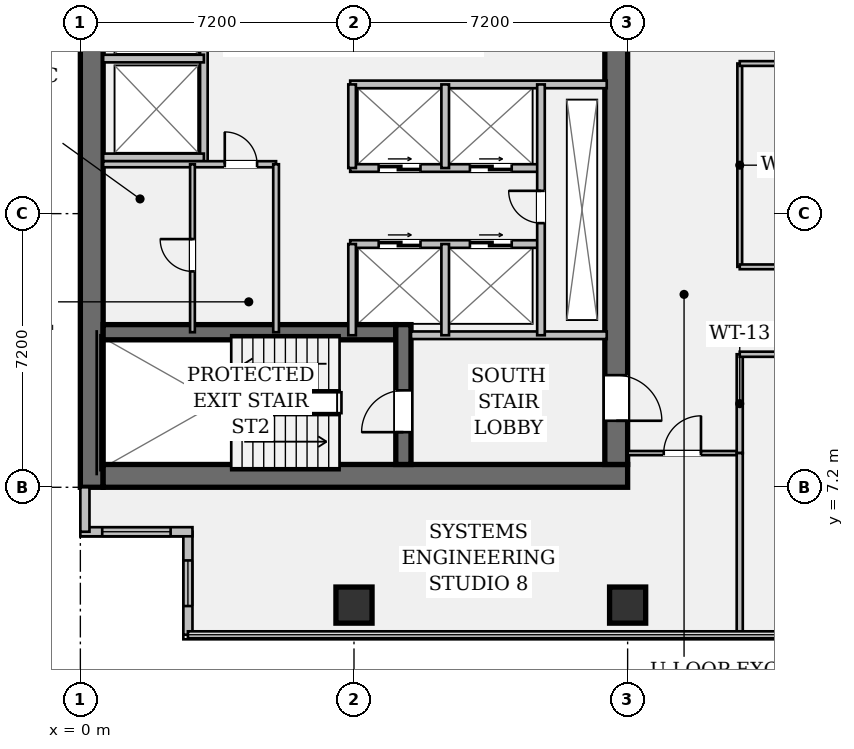
"""IFC4 building model, lengths in metres.
Left out: names, types, materials, properties, quantities, classifications, styles, units other than length and angle.
Written with IfcOpenShell. Run it as: python <this file> out.ifc"""

import sys

from ifc_helpers import new_model, si_unit, direction, frame, frame_2d, origin, origin_2d, place, context, subcontext, project, spatial, rectangle, hollow_rectangle, extrude, element, fill, save


model = new_model("IFC4")
c1 = context("Model", 3, precision=1e-05, world=origin(), true_north=direction((0.0, 1.0)))
c2 = subcontext(c1, "Body", "Model", "MODEL_VIEW")
j1 = project(units=[si_unit("LENGTHUNIT", "METRE"), si_unit("PLANEANGLEUNIT", "RADIAN")], contexts=[c1])
p1 = place(None, origin())
s1 = spatial("IfcSite", under=j1, at=p1, CompositionType="ELEMENT")
p2 = place(p1, origin())
s2 = spatial("IfcBuilding", under=s1, at=p2, CompositionType="ELEMENT")
p3 = place(p2, frame((0.0, 0.0, 113.75)))
s3 = spatial("IfcBuildingStorey", under=s2, at=p3, CompositionType="ELEMENT", Elevation=113.75)
p4 = place(p3, frame((0.3, 7.2, 0.0), z_axis=(0.0, 0.0, 1.0), x_axis=(0.0, 1.0, 0.0)))
e1 = element("IfcWall", 1, at=p4, inside=s3, PredefinedType="SHEAR", context=c2, shape_type="SweptSolid", body=[
    extrude(rectangle(XDim=28.8, YDim=0.6, at=frame_2d((14.4, 0.0))), origin(), (0.0, 0.0, 1.0), 3.58),
])
p5 = place(p3, frame((0.6, 7.5, 0.0), z_axis=(0.0, 0.0, 1.0), x_axis=(1.0, 0.0, 0.0)))
e2 = element("IfcWall", 2, at=p5, inside=s3, PredefinedType="SHEAR", context=c2, shape_type="SweptSolid", body=[
    extrude(rectangle(XDim=13.8, YDim=0.6, at=frame_2d((6.9, 0.0))), origin(), (0.0, 0.0, 1.0), 3.58),
])
p6 = place(p3, frame((14.1, 35.4, 0.0), z_axis=(0.0, 0.0, 1.0), x_axis=(0.0, -1.0, 0.0)))
e3 = element("IfcWall", 3, at=p6, inside=s3, PredefinedType="SHEAR", context=c2, shape_type="SweptSolid", body=[
    extrude(rectangle(XDim=27.6, YDim=0.6, at=frame_2d((13.8, 0.0))), origin(), (0.0, 0.0, 1.0), 3.58),
])
p7 = place(p6, frame((1.3, 0.0, 0.0)))
e4 = element("IfcOpeningElement", 4, at=p7, cuts=e3, PredefinedType="OPENING", context=c2, shape_type="SweptSolid", body=[
    extrude(rectangle(XDim=1.2, YDim=2.15, at=frame_2d((0.6, 1.075))), frame((0.0, 0.312, 0.0), z_axis=(0.0, -1.0, 0.0), x_axis=(1.0, 0.0, 0.0)), (0.0, 0.0, 1.0), 0.624),
])
p8 = place(p6, frame((25.25, 0.0, 0.0)))
e5 = element("IfcOpeningElement", 5, at=p8, cuts=e3, PredefinedType="OPENING", context=c2, shape_type="SweptSolid", body=[
    extrude(rectangle(XDim=1.2, YDim=2.15, at=frame_2d((0.6, 1.075))), frame((0.0, 0.312, 0.0), z_axis=(0.0, -1.0, 0.0), x_axis=(1.0, 0.0, 0.0)), (0.0, 0.0, 1.0), 0.624),
])
p9 = place(p6, frame((14.6, 0.0, 0.0)))
e6 = element("IfcOpeningElement", 6, at=p9, cuts=e3, PredefinedType="OPENING", context=c2, shape_type="SweptSolid", body=[
    extrude(rectangle(XDim=1.6, YDim=2.2, at=frame_2d((0.8, 1.1))), frame((0.0, 0.312, 0.0), z_axis=(0.0, -1.0, 0.0), x_axis=(1.0, 0.0, 0.0)), (0.0, 0.0, 1.0), 0.624),
])
p10 = place(p3, frame((0.6, 11.28, 0.0), z_axis=(0.0, 0.0, 1.0), x_axis=(1.0, 0.0, 0.0)))
e7 = element("IfcWall", 7, at=p10, inside=s3, PredefinedType="SHEAR", context=c2, shape_type="SweptSolid", body=[
    extrude(rectangle(XDim=7.7, YDim=0.4, at=frame_2d((3.85, 0.0))), origin(), (0.0, 0.0, 1.0), 3.58),
])
p11 = place(p3, frame((8.5, 7.8, 0.0), z_axis=(0.0, 0.0, 1.0), x_axis=(0.0, 1.0, 0.0)))
e8 = element("IfcWall", 8, at=p11, inside=s3, PredefinedType="SHEAR", context=c2, shape_type="SweptSolid", body=[
    extrude(rectangle(XDim=3.68, YDim=0.4, at=frame_2d((1.84, 0.0))), origin(), (0.0, 0.0, 1.0), 3.58),
])
p12 = place(p11, frame((0.85, 0.0, 0.0)))
e9 = element("IfcOpeningElement", 9, at=p12, cuts=e8, PredefinedType="OPENING", context=c2, shape_type="SweptSolid", body=[
    extrude(rectangle(XDim=1.1, YDim=2.15, at=frame_2d((0.55, 1.075))), frame((0.0, 0.212, 0.0), z_axis=(0.0, -1.0, 0.0), x_axis=(1.0, 0.0, 0.0)), (0.0, 0.0, 1.0), 0.424),
])
for number, where, z_axis, x_axis in (
    (10, (7.2, 4.1, 0.0), (0.0, 0.0, 1.0), (1.0, 0.0, 0.0)),
    (11, (14.4, 4.1, 0.0), (0.0, 0.0, 1.0), (1.0, 0.0, 0.0)),
):
    element("IfcColumn", number, at=place(p3, frame(where, z_axis=z_axis, x_axis=x_axis)), inside=s3, PredefinedType="COLUMN", context=c2, shape_type="SweptSolid", body=[
        extrude(hollow_rectangle(XDim=0.95, YDim=0.95, WallThickness=0.06, at=origin_2d()), origin(), (0.0, 0.0, 1.0), 3.58),
    ])
p13 = place(p3, frame((2.83, 3.32, 0.0), z_axis=(0.0, 0.0, 1.0), x_axis=(0.0, 1.0, 0.0)))
e12 = element("IfcWall", 12, at=p13, inside=s3, PredefinedType="STANDARD", context=c2, shape_type="SweptSolid", body=[
    extrude(rectangle(XDim=2.71, YDim=0.24, at=frame_2d((1.355, 0.0))), origin(), (0.0, 0.0, 1.0), 3.58),
])
p14 = place(p13, frame((0.755, 0.0, 0.95)))
e13 = element("IfcOpeningElement", 13, at=p14, cuts=e12, PredefinedType="OPENING", context=c2, shape_type="SweptSolid", body=[
    extrude(rectangle(XDim=1.2, YDim=1.8, at=frame_2d((0.6, 0.9))), frame((0.0, 0.132, 0.0), z_axis=(0.0, -1.0, 0.0), x_axis=(1.0, 0.0, 0.0)), (0.0, 0.0, 1.0), 0.264),
])
p15 = place(p3, frame((2.95, 6.03, 0.0), z_axis=(0.0, 0.0, 1.0), x_axis=(-1.0, 0.0, 0.0)))
e14 = element("IfcWall", 14, at=p15, inside=s3, PredefinedType="STANDARD", context=c2, shape_type="SweptSolid", body=[
    extrude(rectangle(XDim=2.95, YDim=0.24, at=frame_2d((1.475, 0.0))), origin(), (0.0, 0.0, 1.0), 3.58),
])
p16 = place(p15, frame((0.575, 0.0, 0.95)))
e15 = element("IfcOpeningElement", 15, at=p16, cuts=e14, PredefinedType="OPENING", context=c2, shape_type="SweptSolid", body=[
    extrude(rectangle(XDim=1.8, YDim=1.35, at=frame_2d((0.9, 0.675))), frame((0.0, 0.132, 0.0), z_axis=(0.0, -1.0, 0.0), x_axis=(1.0, 0.0, 0.0)), (0.0, 0.0, 1.0), 0.264),
])
p17 = place(p3, frame((0.12, 6.03, 0.0), z_axis=(0.0, 0.0, 1.0), x_axis=(0.0, 1.0, 0.0)))
e16 = element("IfcWall", 16, at=p17, inside=s3, PredefinedType="STANDARD", context=c2, shape_type="SweptSolid", body=[
    extrude(rectangle(XDim=1.17, YDim=0.24, at=frame_2d((0.585, 0.0))), origin(), (0.0, 0.0, 1.0), 3.58),
])
p18 = place(p3, frame((8.7, 11.2, 0.0), z_axis=(0.0, 0.0, 1.0), x_axis=(1.0, 0.0, 0.0)))
e17 = element("IfcWall", 17, at=p18, inside=s3, PredefinedType="PARTITIONING", context=c2, shape_type="SweptSolid", body=[
    extrude(rectangle(XDim=5.15, YDim=0.2, at=frame_2d((2.575, 0.0))), origin(), (0.0, 0.0, 1.0), 3.58),
])
p19 = place(p3, frame((3.25, 15.7, 0.0), z_axis=(0.0, 0.0, 1.0), x_axis=(0.0, 1.0, 0.0)))
e18 = element("IfcWall", 18, at=p19, inside=s3, PredefinedType="PARTITIONING", context=c2, shape_type="SweptSolid", body=[
    extrude(rectangle(XDim=13.08, YDim=0.2, at=frame_2d((6.54, 0.0))), origin(), (0.0, 0.0, 1.0), 3.58),
])
for number, where, z_axis, x_axis in (
    (19, (0.6, 15.88, 0.0), (0.0, 0.0, 1.0), (1.0, 0.0, 0.0)),
    (20, (0.6, 18.48, 0.0), (0.0, 0.0, 1.0), (1.0, 0.0, 0.0)),
):
    element("IfcWall", number, at=place(p3, frame(where, z_axis=z_axis, x_axis=x_axis)), inside=s3, PredefinedType="PARTITIONING", context=c2, shape_type="SweptSolid", body=[
        extrude(rectangle(XDim=2.65, YDim=0.2, at=frame_2d((1.325, 0.0))), origin(), (0.0, 0.0, 1.0), 3.58),
    ])
p20 = place(p3, frame((7.1, 17.8, 0.0), z_axis=(0.0, 0.0, 1.0), x_axis=(1.0, 0.0, 0.0)))
e21 = element("IfcWall", 21, at=p20, inside=s3, PredefinedType="PARTITIONING", context=c2, shape_type="SweptSolid", body=[
    extrude(rectangle(XDim=6.75, YDim=0.2, at=frame_2d((3.375, 0.0))), origin(), (0.0, 0.0, 1.0), 3.58),
])
p21 = place(p3, frame((7.1, 15.6, 0.0), z_axis=(0.0, 0.0, 1.0), x_axis=(1.0, 0.0, 0.0)))
e22 = element("IfcWall", 22, at=p21, inside=s3, PredefinedType="PARTITIONING", context=c2, shape_type="SweptSolid", body=[
    extrude(rectangle(XDim=5.02, YDim=0.2, at=frame_2d((2.51, 0.0))), origin(), (0.0, 0.0, 1.0), 3.58),
])
p22 = place(p21, frame((0.75, 0.0, 0.0)))
e23 = element("IfcOpeningElement", 23, at=p22, cuts=e22, PredefinedType="OPENING", context=c2, shape_type="SweptSolid", body=[
    extrude(rectangle(XDim=1.1, YDim=2.2, at=frame_2d((0.55, 1.1))), frame((0.0, 0.112, 0.0), z_axis=(0.0, -1.0, 0.0), x_axis=(1.0, 0.0, 0.0)), (0.0, 0.0, 1.0), 0.224),
])
p23 = place(p21, frame((3.15, 0.0, 0.0)))
e24 = element("IfcOpeningElement", 24, at=p23, cuts=e22, PredefinedType="OPENING", context=c2, shape_type="SweptSolid", body=[
    extrude(rectangle(XDim=1.1, YDim=2.2, at=frame_2d((0.55, 1.1))), frame((0.0, 0.112, 0.0), z_axis=(0.0, -1.0, 0.0), x_axis=(1.0, 0.0, 0.0)), (0.0, 0.0, 1.0), 0.224),
])
p24 = place(p3, frame((7.1, 13.6, 0.0), z_axis=(0.0, 0.0, 1.0), x_axis=(1.0, 0.0, 0.0)))
e25 = element("IfcWall", 25, at=p24, inside=s3, PredefinedType="PARTITIONING", context=c2, shape_type="SweptSolid", body=[
    extrude(rectangle(XDim=5.02, YDim=0.2, at=frame_2d((2.51, 0.0))), origin(), (0.0, 0.0, 1.0), 3.58),
])
p25 = place(p24, frame((0.75, 0.0, 0.0)))
e26 = element("IfcOpeningElement", 26, at=p25, cuts=e25, PredefinedType="OPENING", context=c2, shape_type="SweptSolid", body=[
    extrude(rectangle(XDim=1.1, YDim=2.2, at=frame_2d((0.55, 1.1))), frame((0.0, 0.112, 0.0), z_axis=(0.0, -1.0, 0.0), x_axis=(1.0, 0.0, 0.0)), (0.0, 0.0, 1.0), 0.224),
])
p26 = place(p24, frame((3.15, 0.0, 0.0)))
e27 = element("IfcOpeningElement", 27, at=p26, cuts=e25, PredefinedType="OPENING", context=c2, shape_type="SweptSolid", body=[
    extrude(rectangle(XDim=1.1, YDim=2.2, at=frame_2d((0.55, 1.1))), frame((0.0, 0.112, 0.0), z_axis=(0.0, -1.0, 0.0), x_axis=(1.0, 0.0, 0.0)), (0.0, 0.0, 1.0), 0.224),
])
p27 = place(p3, frame((7.15, 15.6, 0.0), z_axis=(0.0, 0.0, 1.0), x_axis=(0.0, 1.0, 0.0)))
e28 = element("IfcWall", 28, at=p27, inside=s3, PredefinedType="PARTITIONING", context=c2, shape_type="SweptSolid", body=[
    extrude(rectangle(XDim=2.2, YDim=0.2, at=frame_2d((1.1, 0.0))), origin(), (0.0, 0.0, 1.0), 3.58),
])
p28 = place(p3, frame((7.15, 11.2, 0.0), z_axis=(0.0, 0.0, 1.0), x_axis=(0.0, 1.0, 0.0)))
e29 = element("IfcWall", 29, at=p28, inside=s3, PredefinedType="PARTITIONING", context=c2, shape_type="SweptSolid", body=[
    extrude(rectangle(XDim=2.4, YDim=0.2, at=frame_2d((1.2, 0.0))), origin(), (0.0, 0.0, 1.0), 3.58),
])
p29 = place(p3, frame((9.6, 15.6, 0.0), z_axis=(0.0, 0.0, 1.0), x_axis=(0.0, 1.0, 0.0)))
e30 = element("IfcWall", 30, at=p29, inside=s3, PredefinedType="PARTITIONING", context=c2, shape_type="SweptSolid", body=[
    extrude(rectangle(XDim=2.2, YDim=0.2, at=frame_2d((1.1, 0.0))), origin(), (0.0, 0.0, 1.0), 3.58),
])
p30 = place(p3, frame((9.6, 11.2, 0.0), z_axis=(0.0, 0.0, 1.0), x_axis=(0.0, 1.0, 0.0)))
e31 = element("IfcWall", 31, at=p30, inside=s3, PredefinedType="PARTITIONING", context=c2, shape_type="SweptSolid", body=[
    extrude(rectangle(XDim=2.4, YDim=0.2, at=frame_2d((1.2, 0.0))), origin(), (0.0, 0.0, 1.0), 3.58),
])
p31 = place(p3, frame((12.12, 11.2, 0.0), z_axis=(0.0, 0.0, 1.0), x_axis=(0.0, 1.0, 0.0)))
e32 = element("IfcWall", 32, at=p31, inside=s3, PredefinedType="PARTITIONING", context=c2, shape_type="SweptSolid", body=[
    extrude(rectangle(XDim=6.6, YDim=0.2, at=frame_2d((3.3, 0.0))), origin(), (0.0, 0.0, 1.0), 3.58),
])
p32 = place(p31, frame((2.95, 0.0, 0.0)))
e33 = element("IfcOpeningElement", 33, at=p32, cuts=e32, PredefinedType="OPENING", context=c2, shape_type="SweptSolid", body=[
    extrude(rectangle(XDim=0.85, YDim=2.15, at=frame_2d((0.425, 1.075))), frame((0.0, 0.112, 0.0), z_axis=(0.0, -1.0, 0.0), x_axis=(1.0, 0.0, 0.0)), (0.0, 0.0, 1.0), 0.224),
])
p33 = place(p3, frame((0.6, 15.7, 0.0), z_axis=(0.0, 0.0, 1.0), x_axis=(1.0, 0.0, 0.0)))
e34 = element("IfcWall", 34, at=p33, inside=s3, PredefinedType="PARTITIONING", context=c2, shape_type="SweptSolid", body=[
    extrude(rectangle(XDim=4.55, YDim=0.16, at=frame_2d((2.275, 0.0))), origin(), (0.0, 0.0, 1.0), 3.58),
])
p34 = place(p33, frame((3.2, 0.0, 0.0)))
e35 = element("IfcOpeningElement", 35, at=p34, cuts=e34, PredefinedType="OPENING", context=c2, shape_type="SweptSolid", body=[
    extrude(rectangle(XDim=0.85, YDim=2.15, at=frame_2d((0.425, 1.075))), frame((0.0, 0.092, 0.0), z_axis=(0.0, -1.0, 0.0), x_axis=(1.0, 0.0, 0.0)), (0.0, 0.0, 1.0), 0.184),
])
p35 = place(p3, frame((5.15, 11.28, 0.0), z_axis=(0.0, 0.0, 1.0), x_axis=(0.0, 1.0, 0.0)))
e36 = element("IfcWall", 36, at=p35, inside=s3, PredefinedType="PARTITIONING", context=c2, shape_type="SweptSolid", body=[
    extrude(rectangle(XDim=4.42, YDim=0.15, at=frame_2d((2.21, 0.0))), origin(), (0.0, 0.0, 1.0), 3.58),
])
p36 = place(p3, frame((2.95, 11.28, 0.0), z_axis=(0.0, 0.0, 1.0), x_axis=(0.0, 1.0, 0.0)))
e37 = element("IfcWall", 37, at=p36, inside=s3, PredefinedType="PARTITIONING", context=c2, shape_type="SweptSolid", body=[
    extrude(rectangle(XDim=4.42, YDim=0.125, at=frame_2d((2.21, 0.0))), origin(), (0.0, 0.0, 1.0), 3.58),
])
p37 = place(p36, frame((1.6, 0.0, 0.0)))
e38 = element("IfcOpeningElement", 38, at=p37, cuts=e37, PredefinedType="OPENING", context=c2, shape_type="SweptSolid", body=[
    extrude(rectangle(XDim=0.85, YDim=2.15, at=frame_2d((0.425, 1.075))), frame((0.0, 0.074, 0.0), z_axis=(0.0, -1.0, 0.0), x_axis=(1.0, 0.0, 0.0)), (0.0, 0.0, 1.0), 0.149),
])
p38 = place(p3, frame((14.4, 8.1, 0.0), z_axis=(0.0, 0.0, 1.0), x_axis=(1.0, 0.0, 0.0)))
e39 = element("IfcWall", 39, at=p38, inside=s3, PredefinedType="PARTITIONING", context=c2, shape_type="SweptSolid", body=[
    extrude(rectangle(XDim=2.95, YDim=0.11, at=frame_2d((1.475, 0.0))), origin(), (0.0, 0.0, 1.0), 3.098),
])
p39 = place(p38, frame((0.95, 0.0, 0.0)))
e40 = element("IfcOpeningElement", 40, at=p39, cuts=e39, PredefinedType="OPENING", context=c2, shape_type="SweptSolid", body=[
    extrude(rectangle(XDim=0.98, YDim=2.15, at=frame_2d((0.49, 1.075))), frame((0.0, 0.067, 0.0), z_axis=(0.0, -1.0, 0.0), x_axis=(1.0, 0.0, 0.0)), (0.0, 0.0, 1.0), 0.134),
])
p40 = place(p3, frame((17.35, 8.1, 0.0), z_axis=(0.0, 0.0, 1.0), x_axis=(0.0, 1.0, 0.0)))
e41 = element("IfcWall", 41, at=p40, inside=s3, PredefinedType="PARTITIONING", context=c2, shape_type="SweptSolid", body=[
    extrude(rectangle(XDim=2.6, YDim=0.16, at=frame_2d((1.3, 0.0))), origin(), (0.0, 0.0, 1.0), 3.58),
])
p41 = place(p3, frame((17.35, 10.7, 0.0), z_axis=(0.0, 0.0, 1.0), x_axis=(1.0, 0.0, 0.0)))
e42 = element("IfcWall", 42, at=p41, inside=s3, PredefinedType="PARTITIONING", context=c2, shape_type="SweptSolid", body=[
    extrude(rectangle(XDim=17.55, YDim=0.135, at=frame_2d((8.775, 0.0))), origin(), (0.0, 0.0, 1.0), 2.869),
])
p42 = place(p41, frame((2.82, 0.0, 0.0)))
e43 = element("IfcOpeningElement", 43, at=p42, cuts=e42, PredefinedType="OPENING", context=c2, shape_type="SweptSolid", body=[
    extrude(rectangle(XDim=0.98, YDim=2.15, at=frame_2d((0.49, 1.075))), frame((0.0, 0.08, 0.0), z_axis=(0.0, -1.0, 0.0), x_axis=(1.0, 0.0, 0.0)), (0.0, 0.0, 1.0), 0.159),
])
p43 = place(p41, frame((9.45, 0.0, 0.0)))
e44 = element("IfcOpeningElement", 44, at=p43, cuts=e42, PredefinedType="OPENING", context=c2, shape_type="SweptSolid", body=[
    extrude(rectangle(XDim=0.98, YDim=2.15, at=frame_2d((0.49, 1.075))), frame((0.0, 0.08, 0.0), z_axis=(0.0, -1.0, 0.0), x_axis=(1.0, 0.0, 0.0)), (0.0, 0.0, 1.0), 0.159),
])
p44 = place(p41, frame((14.9, 0.0, 0.0)))
e45 = element("IfcOpeningElement", 45, at=p44, cuts=e42, PredefinedType="OPENING", context=c2, shape_type="SweptSolid", body=[
    extrude(rectangle(XDim=0.98, YDim=2.15, at=frame_2d((0.49, 1.075))), frame((0.0, 0.08, 0.0), z_axis=(0.0, -1.0, 0.0), x_axis=(1.0, 0.0, 0.0)), (0.0, 0.0, 1.0), 0.159),
])
p45 = place(p3, frame((17.35, 13.0, 0.0), z_axis=(0.0, 0.0, 1.0), x_axis=(0.0, 1.0, 0.0)))
e46 = element("IfcWall", 46, at=p45, inside=s3, PredefinedType="PARTITIONING", context=c2, shape_type="SweptSolid", body=[
    extrude(rectangle(XDim=5.35, YDim=0.125, at=frame_2d((2.675, 0.0))), origin(), (0.0, 0.0, 1.0), 2.869),
])
p46 = place(p3, frame((17.35, 13.0, 0.0), z_axis=(0.0, 0.0, 1.0), x_axis=(1.0, 0.0, 0.0)))
e47 = element("IfcWall", 47, at=p46, inside=s3, PredefinedType="PARTITIONING", context=c2, shape_type="SweptSolid", body=[
    extrude(rectangle(XDim=15.2, YDim=0.125, at=frame_2d((7.6, 0.0))), origin(), (0.0, 0.0, 1.0), 2.869),
])
p47 = place(p3, frame((17.35, 18.35, 0.0), z_axis=(0.0, 0.0, 1.0), x_axis=(1.0, 0.0, 0.0)))
e48 = element("IfcWall", 48, at=p47, inside=s3, PredefinedType="PARTITIONING", context=c2, shape_type="SweptSolid", body=[
    extrude(rectangle(XDim=15.2, YDim=0.125, at=frame_2d((7.6, 0.0))), origin(), (0.0, 0.0, 1.0), 2.869),
])
p48 = place(p47, frame((3.42, 0.0, 0.0)))
e49 = element("IfcOpeningElement", 49, at=p48, cuts=e48, PredefinedType="OPENING", context=c2, shape_type="SweptSolid", body=[
    extrude(rectangle(XDim=0.98, YDim=2.15, at=frame_2d((0.49, 1.075))), frame((0.0, 0.074, 0.0), z_axis=(0.0, -1.0, 0.0), x_axis=(1.0, 0.0, 0.0)), (0.0, 0.0, 1.0), 0.149),
])
p49 = place(p47, frame((11.02, 0.0, 0.0)))
e50 = element("IfcOpeningElement", 50, at=p49, cuts=e48, PredefinedType="OPENING", context=c2, shape_type="SweptSolid", body=[
    extrude(rectangle(XDim=0.98, YDim=2.15, at=frame_2d((0.49, 1.075))), frame((0.0, 0.074, 0.0), z_axis=(0.0, -1.0, 0.0), x_axis=(1.0, 0.0, 0.0)), (0.0, 0.0, 1.0), 0.149),
])
p50 = place(p3, frame((17.35, 3.32, 0.0), z_axis=(0.0, 0.0, 1.0), x_axis=(0.0, 1.0, 0.0)))
e51 = element("IfcWall", 51, at=p50, inside=s3, PredefinedType="PARTITIONING", context=c2, shape_type="SweptSolid", body=[
    extrude(rectangle(XDim=4.78, YDim=0.16, at=frame_2d((2.39, 0.0))), origin(), (0.0, 0.0, 1.0), 2.869),
])
p51 = place(p14, origin())
e52 = element("IfcWindow", 52, at=p51, inside=s3, PartitioningType="SINGLE_PANEL", PredefinedType="WINDOW", context=c2, shape_type="SweptSolid", body=[
    extrude(rectangle(XDim=1.2, YDim=1.8, at=frame_2d((0.6, 0.9))), frame((0.0, 0.03, 0.0), z_axis=(0.0, -1.0, 0.0), x_axis=(1.0, 0.0, 0.0)), (0.0, 0.0, 1.0), 0.06),
])
fill(e13, e52)
p52 = place(p16, origin())
e53 = element("IfcWindow", 53, at=p52, inside=s3, PartitioningType="SINGLE_PANEL", PredefinedType="WINDOW", context=c2, shape_type="SweptSolid", body=[
    extrude(rectangle(XDim=1.8, YDim=1.35, at=frame_2d((0.9, 0.675))), frame((0.0, 0.03, 0.0), z_axis=(0.0, -1.0, 0.0), x_axis=(1.0, 0.0, 0.0)), (0.0, 0.0, 1.0), 0.06),
])
fill(e15, e53)
p53 = place(p12, origin())
e54 = element("IfcDoor", 54, at=p53, inside=s3, OperationType="SINGLE_SWING_LEFT", PredefinedType="DOOR", context=c2, shape_type="SweptSolid", body=[
    extrude(rectangle(XDim=1.1, YDim=2.15, at=frame_2d((0.55, 1.075))), frame((0.0, 0.025, 0.0), z_axis=(0.0, -1.0, 0.0), x_axis=(1.0, 0.0, 0.0)), (0.0, 0.0, 1.0), 0.05),
])
fill(e9, e54)
p54 = place(p8, origin())
e55 = element("IfcDoor", 55, at=p54, inside=s3, OperationType="SINGLE_SWING_RIGHT", PredefinedType="DOOR", context=c2, shape_type="SweptSolid", body=[
    extrude(rectangle(XDim=1.2, YDim=2.15, at=frame_2d((0.6, 1.075))), frame((0.0, 0.025, 0.0), z_axis=(0.0, -1.0, 0.0), x_axis=(1.0, 0.0, 0.0)), (0.0, 0.0, 1.0), 0.05),
])
fill(e5, e55)
p55 = place(p32, origin())
e56 = element("IfcDoor", 56, at=p55, inside=s3, OperationType="SINGLE_SWING_RIGHT", PredefinedType="DOOR", context=c2, shape_type="SweptSolid", body=[
    extrude(rectangle(XDim=0.85, YDim=2.15, at=frame_2d((0.425, 1.075))), frame((0.0, 0.025, 0.0), z_axis=(0.0, -1.0, 0.0), x_axis=(1.0, 0.0, 0.0)), (0.0, 0.0, 1.0), 0.05),
])
fill(e33, e56)
p56 = place(p22, origin())
e57 = element("IfcDoor", 57, at=p56, inside=s3, OperationType="DOUBLE_DOOR_SLIDING", PredefinedType="DOOR", context=c2, shape_type="SweptSolid", body=[
    extrude(rectangle(XDim=1.1, YDim=2.2, at=frame_2d((0.55, 1.1))), frame((0.0, 0.025, 0.0), z_axis=(0.0, -1.0, 0.0), x_axis=(1.0, 0.0, 0.0)), (0.0, 0.0, 1.0), 0.05),
])
fill(e23, e57)
p57 = place(p23, origin())
e58 = element("IfcDoor", 58, at=p57, inside=s3, OperationType="DOUBLE_DOOR_SLIDING", PredefinedType="DOOR", context=c2, shape_type="SweptSolid", body=[
    extrude(rectangle(XDim=1.1, YDim=2.2, at=frame_2d((0.55, 1.1))), frame((0.0, 0.025, 0.0), z_axis=(0.0, -1.0, 0.0), x_axis=(1.0, 0.0, 0.0)), (0.0, 0.0, 1.0), 0.05),
])
fill(e24, e58)
p58 = place(p25, origin())
e59 = element("IfcDoor", 59, at=p58, inside=s3, OperationType="DOUBLE_DOOR_SLIDING", PredefinedType="DOOR", context=c2, shape_type="SweptSolid", body=[
    extrude(rectangle(XDim=1.1, YDim=2.2, at=frame_2d((0.55, 1.1))), frame((0.0, 0.025, 0.0), z_axis=(0.0, -1.0, 0.0), x_axis=(1.0, 0.0, 0.0)), (0.0, 0.0, 1.0), 0.05),
])
fill(e26, e59)
p59 = place(p26, origin())
e60 = element("IfcDoor", 60, at=p59, inside=s3, OperationType="DOUBLE_DOOR_SLIDING", PredefinedType="DOOR", context=c2, shape_type="SweptSolid", body=[
    extrude(rectangle(XDim=1.1, YDim=2.2, at=frame_2d((0.55, 1.1))), frame((0.0, 0.025, 0.0), z_axis=(0.0, -1.0, 0.0), x_axis=(1.0, 0.0, 0.0)), (0.0, 0.0, 1.0), 0.05),
])
fill(e27, e60)
p60 = place(p34, origin())
e61 = element("IfcDoor", 61, at=p60, inside=s3, OperationType="SINGLE_SWING_LEFT", PredefinedType="DOOR", context=c2, shape_type="SweptSolid", body=[
    extrude(rectangle(XDim=0.85, YDim=2.15, at=frame_2d((0.425, 1.075))), frame((0.0, 0.025, 0.0), z_axis=(0.0, -1.0, 0.0), x_axis=(1.0, 0.0, 0.0)), (0.0, 0.0, 1.0), 0.05),
])
fill(e35, e61)
p61 = place(p37, origin())
e62 = element("IfcDoor", 62, at=p61, inside=s3, OperationType="SINGLE_SWING_RIGHT", PredefinedType="DOOR", context=c2, shape_type="SweptSolid", body=[
    extrude(rectangle(XDim=0.85, YDim=2.15, at=frame_2d((0.425, 1.075))), frame((0.0, 0.025, 0.0), z_axis=(0.0, -1.0, 0.0), x_axis=(1.0, 0.0, 0.0)), (0.0, 0.0, 1.0), 0.05),
])
fill(e38, e62)
p62 = place(p39, origin())
e63 = element("IfcDoor", 63, at=p62, inside=s3, OperationType="SINGLE_SWING_RIGHT", PredefinedType="DOOR", context=c2, shape_type="SweptSolid", body=[
    extrude(rectangle(XDim=0.98, YDim=2.15, at=frame_2d((0.49, 1.075))), frame((0.0, 0.025, 0.0), z_axis=(0.0, -1.0, 0.0), x_axis=(1.0, 0.0, 0.0)), (0.0, 0.0, 1.0), 0.05),
])
fill(e40, e63)
save(model, sys.argv[1])
